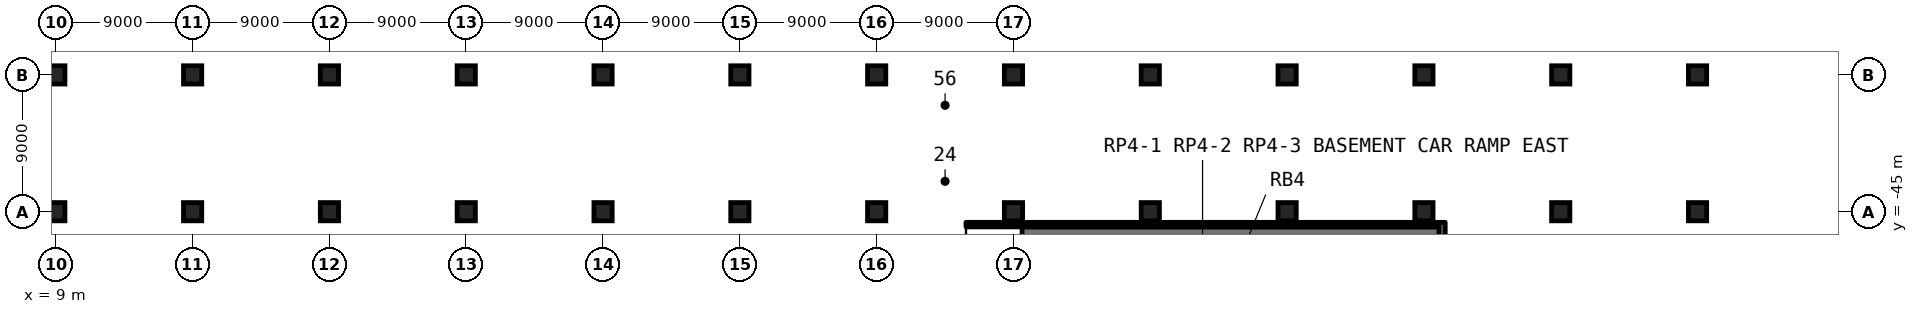
"""IFC4 building model, lengths in metres.
Left out: names, types, materials, properties, quantities, classifications, styles, units other than length and angle.
Written with IfcOpenShell. Run it as: python <this file> out.ifc"""

import sys

from ifc_helpers import new_model, si_unit, direction, frame, frame_2d, origin, origin_2d, place, context, subcontext, project, spatial, polyline, rectangle, outline, extrude, element, save


model = new_model("IFC4")
c1 = context("Model", 3, precision=1e-05, world=origin(), true_north=direction((0.0, 1.0)))
c2 = subcontext(c1, "Body", "Model", "MODEL_VIEW")
j1 = project(units=[si_unit("LENGTHUNIT", "METRE"), si_unit("PLANEANGLEUNIT", "RADIAN")], contexts=[c1])
p1 = place(None, origin())
s1 = spatial("IfcSite", under=j1, at=p1, CompositionType="ELEMENT")
p2 = place(p1, origin())
s2 = spatial("IfcBuilding", under=s1, at=p2, CompositionType="ELEMENT")
p3 = place(p2, frame((0.0, 0.0, -9.0)))
s3 = spatial("IfcBuildingStorey", under=s2, at=p3, CompositionType="ELEMENT", Elevation=-9.0)
for number, where, z_axis, x_axis in (
    (1, (9.0, -45.0, 0.0), (0.0, 0.0, 1.0), (1.0, 0.0, 0.0)),
    (2, (9.0, -36.0, 0.0), (0.0, 0.0, 1.0), (1.0, 0.0, 0.0)),
    (3, (18.0, -45.0, 0.0), (0.0, 0.0, 1.0), (1.0, 0.0, 0.0)),
    (4, (18.0, -36.0, 0.0), (0.0, 0.0, 1.0), (1.0, 0.0, 0.0)),
    (5, (27.0, -45.0, 0.0), (0.0, 0.0, 1.0), (1.0, 0.0, 0.0)),
    (6, (27.0, -36.0, 0.0), (0.0, 0.0, 1.0), (1.0, 0.0, 0.0)),
    (7, (36.0, -45.0, 0.0), (0.0, 0.0, 1.0), (1.0, 0.0, 0.0)),
    (8, (36.0, -36.0, 0.0), (0.0, 0.0, 1.0), (1.0, 0.0, 0.0)),
    (9, (45.0, -45.0, 0.0), (0.0, 0.0, 1.0), (1.0, 0.0, 0.0)),
    (10, (45.0, -36.0, 0.0), (0.0, 0.0, 1.0), (1.0, 0.0, 0.0)),
    (11, (54.0, -45.0, 0.0), (0.0, 0.0, 1.0), (1.0, 0.0, 0.0)),
    (12, (54.0, -36.0, 0.0), (0.0, 0.0, 1.0), (1.0, 0.0, 0.0)),
    (13, (63.0, -45.0, 0.0), (0.0, 0.0, 1.0), (1.0, 0.0, 0.0)),
    (14, (63.0, -36.0, 0.0), (0.0, 0.0, 1.0), (1.0, 0.0, 0.0)),
    (15, (72.0, -45.0, 0.0), (0.0, 0.0, 1.0), (1.0, 0.0, 0.0)),
    (16, (72.0, -36.0, 0.0), (0.0, 0.0, 1.0), (1.0, 0.0, 0.0)),
    (17, (81.0, -45.0, 0.0), (0.0, 0.0, 1.0), (1.0, 0.0, 0.0)),
    (18, (81.0, -36.0, 0.0), (0.0, 0.0, 1.0), (1.0, 0.0, 0.0)),
    (19, (90.0, -45.0, 0.0), (0.0, 0.0, 1.0), (1.0, 0.0, 0.0)),
    (20, (90.0, -36.0, 0.0), (0.0, 0.0, 1.0), (1.0, 0.0, 0.0)),
    (21, (99.0, -45.0, 0.0), (0.0, 0.0, 1.0), (1.0, 0.0, 0.0)),
    (22, (99.0, -36.0, 0.0), (0.0, 0.0, 1.0), (1.0, 0.0, 0.0)),
    (23, (108.0, -45.0, 0.0), (0.0, 0.0, 1.0), (1.0, 0.0, 0.0)),
    (24, (108.0, -36.0, 0.0), (0.0, 0.0, 1.0), (1.0, 0.0, 0.0)),
    (25, (117.0, -45.0, 0.0), (0.0, 0.0, 1.0), (1.0, 0.0, 0.0)),
    (26, (117.0, -36.0, 0.0), (0.0, 0.0, 1.0), (1.0, 0.0, 0.0)),
):
    element("IfcColumn", number, at=place(p3, frame(where, z_axis=z_axis, x_axis=x_axis)), inside=s3, PredefinedType="COLUMN", context=c2, shape_type="SweptSolid", body=[
        extrude(rectangle(XDim=1.2, YDim=1.2, at=origin_2d()), origin(), (0.0, 0.0, 1.0), 4.5),
    ])
p4 = place(p3, frame((100.0, -49.5, 0.0), z_axis=(0.0, 0.0, 1.0), x_axis=(-1.0, 0.0, 0.0)))
e27 = element("IfcWall", 27, at=p4, inside=s3, PredefinedType="SOLIDWALL", context=c2, shape_type="SweptSolid", body=[
    extrude(outline(polyline([(0.0, 0.0), (27.438, 0.0), (27.438, 0.05), (3.0, 3.96), (0.0, 4.2), (0.0, 0.0)])), frame((0.0, 3.5, 0.0), z_axis=(0.0, -1.0, 0.0), x_axis=(1.0, 0.0, 0.0)), (0.0, 0.0, 1.0), 7.0),
])
p5 = place(p3, frame((100.0, -45.85, 0.0), z_axis=(0.0, 0.0, 1.0), x_axis=(-1.0, 0.0, 0.0)))
e28 = element("IfcWall", 28, at=p5, inside=s3, PredefinedType="SOLIDWALL", context=c2, shape_type="SweptSolid", body=[
    extrude(rectangle(XDim=20.2, YDim=0.3, at=frame_2d((10.1, 0.0))), origin(), (0.0, 0.0, 1.0), 5.6),
])
p6 = place(p3, frame((79.8, -45.85, 0.0), z_axis=(0.0, 0.0, 1.0), x_axis=(-1.0, 0.0, 0.0)))
e29 = element("IfcWall", 29, at=p6, inside=s3, PredefinedType="SOLIDWALL", context=c2, shape_type="SweptSolid", body=[
    extrude(rectangle(XDim=10.925, YDim=0.3, at=frame_2d((5.462, 0.0))), origin(), (0.0, 0.0, 1.0), 4.1),
])
p7 = place(p3, frame((100.2, -53.3, 0.0), z_axis=(0.0, 0.0, 1.0), x_axis=(0.0, 1.0, 0.0)))
e30 = element("IfcWall", 30, at=p7, inside=s3, PredefinedType="SOLIDWALL", context=c2, shape_type="SweptSolid", body=[
    extrude(rectangle(XDim=7.6, YDim=0.4, at=frame_2d((3.8, 0.0))), origin(), (0.0, 0.0, 1.0), 4.1),
])
save(model, sys.argv[1])
